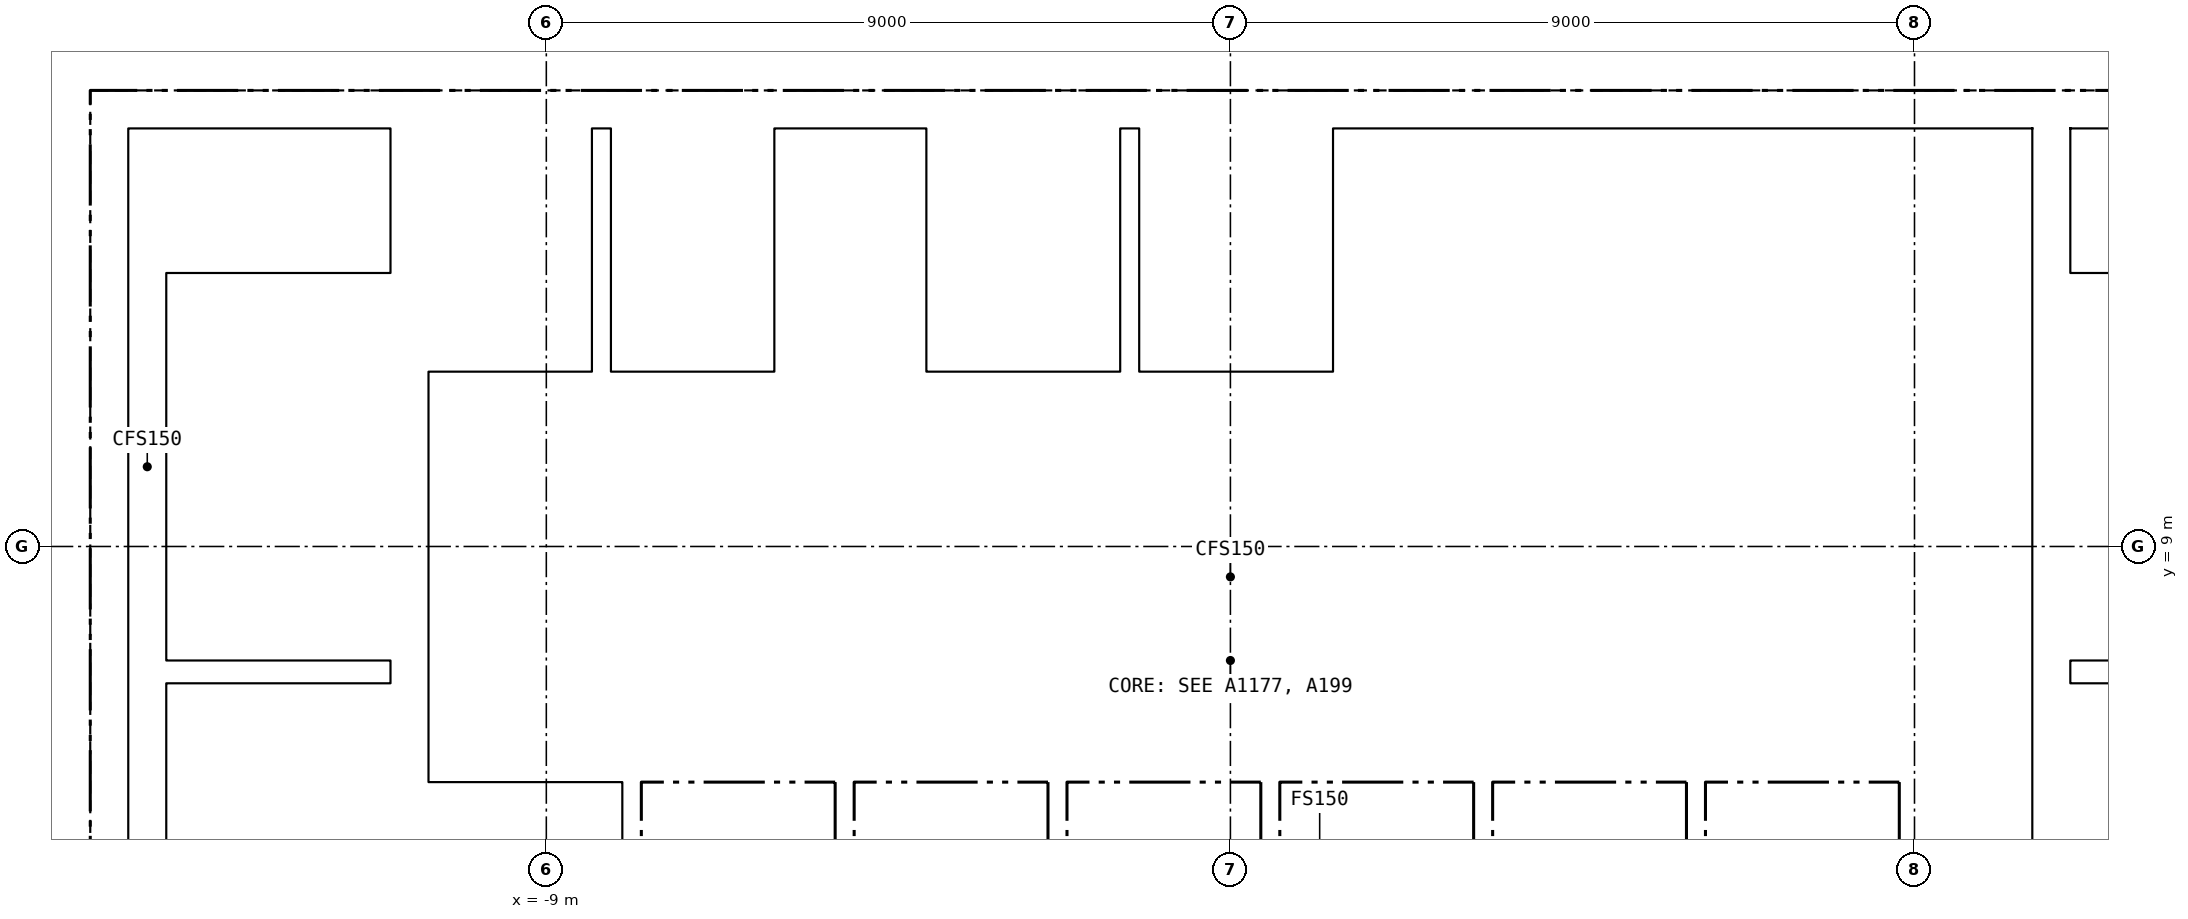
"""IFC4 building model, lengths in metres.
Left out: names, types, materials, properties, quantities, classifications, styles, units other than length and angle.
Written with IfcOpenShell. Run it as: python <this file> out.ifc"""

import sys

from ifc_helpers import new_model, si_unit, direction, frame, frame_2d, origin, place, context, subcontext, project, spatial, rectangle, extrude, element, fill, save


model = new_model("IFC4")
c1 = context("Model", 3, precision=1e-05, world=origin(), true_north=direction((0.0, 1.0)))
c2 = subcontext(c1, "Body", "Model", "MODEL_VIEW")
j1 = project(units=[si_unit("LENGTHUNIT", "METRE"), si_unit("PLANEANGLEUNIT", "RADIAN")], contexts=[c1])
p1 = place(None, origin())
s1 = spatial("IfcSite", under=j1, at=p1, CompositionType="ELEMENT")
p2 = place(p1, origin())
s2 = spatial("IfcBuilding", under=s1, at=p2, CompositionType="ELEMENT")
p3 = place(p2, frame((0.0, 0.0, 271.9)))
s3 = spatial("IfcBuildingStorey", under=s2, at=p3, CompositionType="ELEMENT", Elevation=271.9)
p4 = place(p3, frame((-15.0, 14.75, -0.15), z_axis=(0.0, 0.0, 1.0), x_axis=(1.0, 0.0, 0.0)))
e1 = element("IfcWall", 1, at=p4, inside=s3, PredefinedType="SOLIDWALL", context=c2, shape_type="SweptSolid", body=[
    extrude(rectangle(XDim=30.0, YDim=0.5, at=frame_2d((15.0, 0.0))), origin(), (0.0, 0.0, 1.0), 3.65),
])
p5 = place(p4, frame((9.25, 0.0, 0.15)))
e2 = element("IfcOpeningElement", 2, at=p5, cuts=e1, PredefinedType="OPENING", context=c2, shape_type="SweptSolid", body=[
    extrude(rectangle(XDim=1.5, YDim=2.1, at=frame_2d((0.75, 1.05))), frame((0.0, 0.26, 0.0), z_axis=(0.0, -1.0, 0.0), x_axis=(1.0, 0.0, 0.0)), (0.0, 0.0, 1.0), 0.52),
])
p6 = place(p4, frame((19.4, 0.0, 0.15)))
e3 = element("IfcOpeningElement", 3, at=p6, cuts=e1, PredefinedType="OPENING", context=c2, shape_type="SweptSolid", body=[
    extrude(rectangle(XDim=1.5, YDim=2.1, at=frame_2d((0.75, 1.05))), frame((0.0, 0.26, 0.0), z_axis=(0.0, -1.0, 0.0), x_axis=(1.0, 0.0, 0.0)), (0.0, 0.0, 1.0), 0.52),
])
p7 = place(p4, frame((1.5, 0.0, 0.15)))
e4 = element("IfcOpeningElement", 4, at=p7, cuts=e1, PredefinedType="OPENING", context=c2, shape_type="SweptSolid", body=[
    extrude(rectangle(XDim=1.2, YDim=2.1, at=frame_2d((0.6, 1.05))), frame((0.0, 0.26, 0.0), z_axis=(0.0, -1.0, 0.0), x_axis=(1.0, 0.0, 0.0)), (0.0, 0.0, 1.0), 0.52),
])
p8 = place(p4, frame((27.3, 0.0, 0.15)))
e5 = element("IfcOpeningElement", 5, at=p8, cuts=e1, PredefinedType="OPENING", context=c2, shape_type="SweptSolid", body=[
    extrude(rectangle(XDim=1.2, YDim=2.1, at=frame_2d((0.6, 1.05))), frame((0.0, 0.26, 0.0), z_axis=(0.0, -1.0, 0.0), x_axis=(1.0, 0.0, 0.0)), (0.0, 0.0, 1.0), 0.52),
])
for number, where, z_axis, x_axis in (
    (6, (-14.75, 0.5, -0.15), (0.0, 0.0, 1.0), (0.0, 1.0, 0.0)),
    (7, (-10.8, 0.5, -0.15), (0.0, 0.0, 1.0), (0.0, 1.0, 0.0)),
    (8, (10.8, 0.5, -0.15), (0.0, 0.0, 1.0), (0.0, 1.0, 0.0)),
):
    element("IfcWall", number, at=place(p3, frame(where, z_axis=z_axis, x_axis=x_axis)), inside=s3, PredefinedType="SOLIDWALL", context=c2, shape_type="SweptSolid", body=[
        extrude(rectangle(XDim=14.0, YDim=0.5, at=frame_2d((7.0, 0.0))), origin(), (0.0, 0.0, 1.0), 3.65),
    ])
p9 = place(p3, frame((-10.55, 6.025, 0.0), z_axis=(0.0, 0.0, 1.0), x_axis=(1.0, 0.0, 0.0)))
e9 = element("IfcWall", 9, at=p9, inside=s3, PredefinedType="PARTITIONING", context=c2, shape_type="SweptSolid", body=[
    extrude(rectangle(XDim=21.1, YDim=0.25, at=frame_2d((10.55, 0.0))), origin(), (0.0, 0.0, 1.0), 3.5),
])
p10 = place(p3, frame((-4.125, 8.55, 0.0), z_axis=(0.0, 0.0, 1.0), x_axis=(1.0, 0.0, 0.0)))
e10 = element("IfcWall", 10, at=p10, inside=s3, PredefinedType="PARTITIONING", context=c2, shape_type="SweptSolid", body=[
    extrude(rectangle(XDim=14.675, YDim=0.2, at=frame_2d((7.337, 0.0))), origin(), (0.0, 0.0, 1.0), 3.5),
])
p11 = place(p10, frame((2.438, 0.0, 0.0)))
e11 = element("IfcOpeningElement", 11, at=p11, cuts=e10, PredefinedType="OPENING", context=c2, shape_type="SweptSolid", body=[
    extrude(rectangle(XDim=1.0, YDim=2.1, at=frame_2d((0.5, 1.05))), frame((0.0, 0.11, 0.0), z_axis=(0.0, -1.0, 0.0), x_axis=(1.0, 0.0, 0.0)), (0.0, 0.0, 1.0), 0.22),
])
p12 = place(p10, frame((6.775, 0.0, 0.0)))
e12 = element("IfcOpeningElement", 12, at=p12, cuts=e10, PredefinedType="OPENING", context=c2, shape_type="SweptSolid", body=[
    extrude(rectangle(XDim=1.0, YDim=2.1, at=frame_2d((0.5, 1.05))), frame((0.0, 0.11, 0.0), z_axis=(0.0, -1.0, 0.0), x_axis=(1.0, 0.0, 0.0)), (0.0, 0.0, 1.0), 0.22),
])
p13 = place(p10, frame((10.363, 0.0, 0.0)))
e13 = element("IfcOpeningElement", 13, at=p13, cuts=e10, PredefinedType="OPENING", context=c2, shape_type="SweptSolid", body=[
    extrude(rectangle(XDim=1.0, YDim=2.1, at=frame_2d((0.5, 1.05))), frame((0.0, 0.11, 0.0), z_axis=(0.0, -1.0, 0.0), x_axis=(1.0, 0.0, 0.0)), (0.0, 0.0, 1.0), 0.22),
])
p14 = place(p10, frame((13.475, 0.0, 0.0)))
e14 = element("IfcOpeningElement", 14, at=p14, cuts=e10, PredefinedType="OPENING", context=c2, shape_type="SweptSolid", body=[
    extrude(rectangle(XDim=0.9, YDim=2.1, at=frame_2d((0.45, 1.05))), frame((0.0, 0.11, 0.0), z_axis=(0.0, -1.0, 0.0), x_axis=(1.0, 0.0, 0.0)), (0.0, 0.0, 1.0), 0.22),
])
p15 = place(p3, frame((-10.55, 11.2, 0.0), z_axis=(0.0, 0.0, 1.0), x_axis=(1.0, 0.0, 0.0)))
e15 = element("IfcWall", 15, at=p15, inside=s3, PredefinedType="PARTITIONING", context=c2, shape_type="SweptSolid", body=[
    extrude(rectangle(XDim=4.8, YDim=0.2, at=frame_2d((2.4, 0.0))), origin(), (0.0, 0.0, 1.0), 3.5),
])
p16 = place(p15, frame((0.525, 0.0, 0.0)))
e16 = element("IfcOpeningElement", 16, at=p16, cuts=e15, PredefinedType="OPENING", context=c2, shape_type="SweptSolid", body=[
    extrude(rectangle(XDim=1.1, YDim=2.1, at=frame_2d((0.55, 1.05))), frame((0.0, 0.11, 0.0), z_axis=(0.0, -1.0, 0.0), x_axis=(1.0, 0.0, 0.0)), (0.0, 0.0, 1.0), 0.22),
])
p17 = place(p15, frame((2.925, 0.0, 0.0)))
e17 = element("IfcOpeningElement", 17, at=p17, cuts=e15, PredefinedType="OPENING", context=c2, shape_type="SweptSolid", body=[
    extrude(rectangle(XDim=1.1, YDim=2.1, at=frame_2d((0.55, 1.05))), frame((0.0, 0.11, 0.0), z_axis=(0.0, -1.0, 0.0), x_axis=(1.0, 0.0, 0.0)), (0.0, 0.0, 1.0), 0.22),
])
p18 = place(p3, frame((-4.25, 11.2, 0.0), z_axis=(0.0, 0.0, 1.0), x_axis=(1.0, 0.0, 0.0)))
e18 = element("IfcWall", 18, at=p18, inside=s3, PredefinedType="PARTITIONING", context=c2, shape_type="SweptSolid", body=[
    extrude(rectangle(XDim=8.65, YDim=0.2, at=frame_2d((4.325, 0.0))), origin(), (0.0, 0.0, 1.0), 3.5),
])
p19 = place(p18, frame((0.825, 0.0, 0.0)))
e19 = element("IfcOpeningElement", 19, at=p19, cuts=e18, PredefinedType="OPENING", context=c2, shape_type="SweptSolid", body=[
    extrude(rectangle(XDim=1.4, YDim=2.1, at=frame_2d((0.7, 1.05))), frame((0.0, 0.11, 0.0), z_axis=(0.0, -1.0, 0.0), x_axis=(1.0, 0.0, 0.0)), (0.0, 0.0, 1.0), 0.22),
])
p20 = place(p18, frame((3.625, 0.0, 0.0)))
e20 = element("IfcOpeningElement", 20, at=p20, cuts=e18, PredefinedType="OPENING", context=c2, shape_type="SweptSolid", body=[
    extrude(rectangle(XDim=1.4, YDim=2.1, at=frame_2d((0.7, 1.05))), frame((0.0, 0.11, 0.0), z_axis=(0.0, -1.0, 0.0), x_axis=(1.0, 0.0, 0.0)), (0.0, 0.0, 1.0), 0.22),
])
p21 = place(p18, frame((6.675, 0.0, 0.0)))
e21 = element("IfcOpeningElement", 21, at=p21, cuts=e18, PredefinedType="OPENING", context=c2, shape_type="SweptSolid", body=[
    extrude(rectangle(XDim=0.9, YDim=2.1, at=frame_2d((0.45, 1.05))), frame((0.0, 0.11, 0.0), z_axis=(0.0, -1.0, 0.0), x_axis=(1.0, 0.0, 0.0)), (0.0, 0.0, 1.0), 0.22),
])
p22 = place(p3, frame((5.9, 11.2, 0.0), z_axis=(0.0, 0.0, 1.0), x_axis=(1.0, 0.0, 0.0)))
e22 = element("IfcWall", 22, at=p22, inside=s3, PredefinedType="PARTITIONING", context=c2, shape_type="SweptSolid", body=[
    extrude(rectangle(XDim=4.65, YDim=0.2, at=frame_2d((2.325, 0.0))), origin(), (0.0, 0.0, 1.0), 3.5),
])
p23 = place(p22, frame((1.075, 0.0, 0.0)))
e23 = element("IfcOpeningElement", 23, at=p23, cuts=e22, PredefinedType="OPENING", context=c2, shape_type="SweptSolid", body=[
    extrude(rectangle(XDim=0.9, YDim=2.1, at=frame_2d((0.45, 1.05))), frame((0.0, 0.11, 0.0), z_axis=(0.0, -1.0, 0.0), x_axis=(1.0, 0.0, 0.0)), (0.0, 0.0, 1.0), 0.22),
])
p24 = place(p22, frame((3.4, 0.0, 0.0)))
e24 = element("IfcOpeningElement", 24, at=p24, cuts=e22, PredefinedType="OPENING", context=c2, shape_type="SweptSolid", body=[
    extrude(rectangle(XDim=0.9, YDim=2.1, at=frame_2d((0.45, 1.05))), frame((0.0, 0.11, 0.0), z_axis=(0.0, -1.0, 0.0), x_axis=(1.0, 0.0, 0.0)), (0.0, 0.0, 1.0), 0.22),
])
p25 = place(p3, frame((-4.125, 6.15, 0.0), z_axis=(0.0, 0.0, 1.0), x_axis=(0.0, 1.0, 0.0)))
e25 = element("IfcWall", 25, at=p25, inside=s3, PredefinedType="PARTITIONING", context=c2, shape_type="SweptSolid", body=[
    extrude(rectangle(XDim=4.95, YDim=0.25, at=frame_2d((2.475, 0.0))), origin(), (0.0, 0.0, 1.0), 3.5),
])
p26 = place(p25, frame((3.125, 0.0, 0.0)))
e26 = element("IfcOpeningElement", 26, at=p26, cuts=e25, PredefinedType="OPENING", context=c2, shape_type="SweptSolid", body=[
    extrude(rectangle(XDim=1.2, YDim=2.1, at=frame_2d((0.6, 1.05))), frame((0.0, 0.135, 0.0), z_axis=(0.0, -1.0, 0.0), x_axis=(1.0, 0.0, 0.0)), (0.0, 0.0, 1.0), 0.27),
])
for number, where, z_axis, x_axis in (
    (27, (-7.875, 3.6, 0.0), (0.0, 0.0, 1.0), (0.0, 1.0, 0.0)),
    (28, (-5.075, 3.6, 0.0), (0.0, 0.0, 1.0), (0.0, 1.0, 0.0)),
    (29, (-2.275, 3.6, 0.0), (0.0, 0.0, 1.0), (0.0, 1.0, 0.0)),
    (30, (0.525, 3.6, 0.0), (0.0, 0.0, 1.0), (0.0, 1.0, 0.0)),
    (31, (3.325, 3.6, 0.0), (0.0, 0.0, 1.0), (0.0, 1.0, 0.0)),
    (32, (6.125, 3.6, 0.0), (0.0, 0.0, 1.0), (0.0, 1.0, 0.0)),
    (33, (8.925, 3.6, 0.0), (0.0, 0.0, 1.0), (0.0, 1.0, 0.0)),
):
    element("IfcWall", number, at=place(p3, frame(where, z_axis=z_axis, x_axis=x_axis)), inside=s3, PredefinedType="PARTITIONING", context=c2, shape_type="SweptSolid", body=[
        extrude(rectangle(XDim=2.3, YDim=0.25, at=frame_2d((1.15, 0.0))), origin(), (0.0, 0.0, 1.0), 3.5),
    ])
for number, where, z_axis, x_axis in (
    (34, (1.7, 6.15, 0.0), (0.0, 0.0, 1.0), (0.0, 1.0, 0.0)),
    (35, (4.6, 6.15, 0.0), (0.0, 0.0, 1.0), (0.0, 1.0, 0.0)),
):
    element("IfcWall", number, at=place(p3, frame(where, z_axis=z_axis, x_axis=x_axis)), inside=s3, PredefinedType="PARTITIONING", context=c2, shape_type="SweptSolid", body=[
        extrude(rectangle(XDim=2.3, YDim=0.15, at=frame_2d((1.15, 0.0))), origin(), (0.0, 0.0, 1.0), 3.5),
    ])
p27 = place(p3, frame((8.925, 6.15, 0.0), z_axis=(0.0, 0.0, 1.0), x_axis=(0.0, 1.0, 0.0)))
e36 = element("IfcWall", 36, at=p27, inside=s3, PredefinedType="PARTITIONING", context=c2, shape_type="SweptSolid", body=[
    extrude(rectangle(XDim=2.3, YDim=0.25, at=frame_2d((1.15, 0.0))), origin(), (0.0, 0.0, 1.0), 3.5),
])
for number, where, z_axis, x_axis in (
    (37, (-8.275, 11.3, 0.0), (0.0, 0.0, 1.0), (0.0, 1.0, 0.0)),
    (38, (-5.875, 11.3, 0.0), (0.0, 0.0, 1.0), (0.0, 1.0, 0.0)),
    (39, (-4.125, 11.3, 0.0), (0.0, 0.0, 1.0), (0.0, 1.0, 0.0)),
    (40, (-1.325, 11.3, 0.0), (0.0, 0.0, 1.0), (0.0, 1.0, 0.0)),
    (41, (1.475, 11.3, 0.0), (0.0, 0.0, 1.0), (0.0, 1.0, 0.0)),
    (42, (4.275, 11.3, 0.0), (0.0, 0.0, 1.0), (0.0, 1.0, 0.0)),
    (43, (6.025, 11.3, 0.0), (0.0, 0.0, 1.0), (0.0, 1.0, 0.0)),
    (44, (8.825, 11.3, 0.0), (0.0, 0.0, 1.0), (0.0, 1.0, 0.0)),
):
    element("IfcWall", number, at=place(p3, frame(where, z_axis=z_axis, x_axis=x_axis)), inside=s3, PredefinedType="PARTITIONING", context=c2, shape_type="SweptSolid", body=[
        extrude(rectangle(XDim=3.2, YDim=0.25, at=frame_2d((1.6, 0.0))), origin(), (0.0, 0.0, 1.0), 3.5),
    ])
p28 = place(p3, frame((-14.0, 7.35, 0.0), z_axis=(0.0, 0.0, 1.0), x_axis=(1.0, 0.0, 0.0)))
e45 = element("IfcWall", 45, at=p28, inside=s3, PredefinedType="SOLIDWALL", context=c2, shape_type="SweptSolid", body=[
    extrude(rectangle(XDim=2.95, YDim=0.3, at=frame_2d((1.475, 0.0))), origin(), (0.0, 0.0, 1.0), 3.5),
])
p29 = place(p3, frame((-14.25, 0.5, 0.0), z_axis=(0.0, 0.0, 1.0), x_axis=(0.0, 1.0, 0.0)))
e46 = element("IfcWall", 46, at=p29, inside=s3, PredefinedType="SOLIDWALL", context=c2, shape_type="SweptSolid", body=[
    extrude(rectangle(XDim=14.0, YDim=0.5, at=frame_2d((7.0, 0.0))), origin(), (0.0, 0.0, 1.0), 3.5),
])
p30 = place(p3, frame((11.05, 7.35, 0.0), z_axis=(0.0, 0.0, 1.0), x_axis=(1.0, 0.0, 0.0)))
e47 = element("IfcWall", 47, at=p30, inside=s3, PredefinedType="SOLIDWALL", context=c2, shape_type="SweptSolid", body=[
    extrude(rectangle(XDim=2.95, YDim=0.3, at=frame_2d((1.475, 0.0))), origin(), (0.0, 0.0, 1.0), 3.5),
])
p31 = place(p3, frame((-17.177, 11.848, 0.0), z_axis=(0.0, 0.0, 1.0), x_axis=(0.309030503714, 0.951052126739, 0.0)))
e48 = element("IfcWall", 48, at=p31, inside=s3, PredefinedType="PARTITIONING", context=c2, shape_type="SweptSolid", body=[
    extrude(rectangle(XDim=5.563, YDim=0.15, at=frame_2d((2.782, 0.0))), origin(), (0.0, 0.0, 1.0), 2.751),
])
p32 = place(p26, origin())
e49 = element("IfcDoor", 49, at=p32, inside=s3, OperationType="SINGLE_SWING_LEFT", PredefinedType="DOOR", context=c2, shape_type="SweptSolid", body=[
    extrude(rectangle(XDim=1.2, YDim=2.1, at=frame_2d((0.6, 1.05))), frame((0.0, 0.025, 0.0), z_axis=(0.0, -1.0, 0.0), x_axis=(1.0, 0.0, 0.0)), (0.0, 0.0, 1.0), 0.05),
])
fill(e26, e49)
p33 = place(p11, origin())
e50 = element("IfcDoor", 50, at=p33, inside=s3, OperationType="SINGLE_SWING_LEFT", PredefinedType="DOOR", context=c2, shape_type="SweptSolid", body=[
    extrude(rectangle(XDim=1.0, YDim=2.1, at=frame_2d((0.5, 1.05))), frame((0.0, 0.025, 0.0), z_axis=(0.0, -1.0, 0.0), x_axis=(1.0, 0.0, 0.0)), (0.0, 0.0, 1.0), 0.05),
])
fill(e11, e50)
p34 = place(p12, origin())
e51 = element("IfcDoor", 51, at=p34, inside=s3, OperationType="SINGLE_SWING_RIGHT", PredefinedType="DOOR", context=c2, shape_type="SweptSolid", body=[
    extrude(rectangle(XDim=1.0, YDim=2.1, at=frame_2d((0.5, 1.05))), frame((0.0, 0.025, 0.0), z_axis=(0.0, -1.0, 0.0), x_axis=(1.0, 0.0, 0.0)), (0.0, 0.0, 1.0), 0.05),
])
fill(e12, e51)
p35 = place(p13, origin())
e52 = element("IfcDoor", 52, at=p35, inside=s3, OperationType="SINGLE_SWING_LEFT", PredefinedType="DOOR", context=c2, shape_type="SweptSolid", body=[
    extrude(rectangle(XDim=1.0, YDim=2.1, at=frame_2d((0.5, 1.05))), frame((0.0, 0.025, 0.0), z_axis=(0.0, -1.0, 0.0), x_axis=(1.0, 0.0, 0.0)), (0.0, 0.0, 1.0), 0.05),
])
fill(e13, e52)
p36 = place(p14, origin())
e53 = element("IfcDoor", 53, at=p36, inside=s3, OperationType="SINGLE_SWING_RIGHT", PredefinedType="DOOR", context=c2, shape_type="SweptSolid", body=[
    extrude(rectangle(XDim=0.9, YDim=2.1, at=frame_2d((0.45, 1.05))), frame((0.0, 0.025, 0.0), z_axis=(0.0, -1.0, 0.0), x_axis=(1.0, 0.0, 0.0)), (0.0, 0.0, 1.0), 0.05),
])
fill(e14, e53)
p37 = place(p16, origin())
e54 = element("IfcDoor", 54, at=p37, inside=s3, OperationType="DOUBLE_DOOR_SLIDING", PredefinedType="DOOR", context=c2, shape_type="SweptSolid", body=[
    extrude(rectangle(XDim=1.1, YDim=2.1, at=frame_2d((0.55, 1.05))), frame((0.0, 0.025, 0.0), z_axis=(0.0, -1.0, 0.0), x_axis=(1.0, 0.0, 0.0)), (0.0, 0.0, 1.0), 0.05),
])
fill(e16, e54)
p38 = place(p17, origin())
e55 = element("IfcDoor", 55, at=p38, inside=s3, OperationType="DOUBLE_DOOR_SLIDING", PredefinedType="DOOR", context=c2, shape_type="SweptSolid", body=[
    extrude(rectangle(XDim=1.1, YDim=2.1, at=frame_2d((0.55, 1.05))), frame((0.0, 0.025, 0.0), z_axis=(0.0, -1.0, 0.0), x_axis=(1.0, 0.0, 0.0)), (0.0, 0.0, 1.0), 0.05),
])
fill(e17, e55)
p39 = place(p19, origin())
e56 = element("IfcDoor", 56, at=p39, inside=s3, OperationType="DOUBLE_DOOR_SLIDING", PredefinedType="DOOR", context=c2, shape_type="SweptSolid", body=[
    extrude(rectangle(XDim=1.4, YDim=2.1, at=frame_2d((0.7, 1.05))), frame((0.0, 0.025, 0.0), z_axis=(0.0, -1.0, 0.0), x_axis=(1.0, 0.0, 0.0)), (0.0, 0.0, 1.0), 0.05),
])
fill(e19, e56)
p40 = place(p20, origin())
e57 = element("IfcDoor", 57, at=p40, inside=s3, OperationType="DOUBLE_DOOR_SLIDING", PredefinedType="DOOR", context=c2, shape_type="SweptSolid", body=[
    extrude(rectangle(XDim=1.4, YDim=2.1, at=frame_2d((0.7, 1.05))), frame((0.0, 0.025, 0.0), z_axis=(0.0, -1.0, 0.0), x_axis=(1.0, 0.0, 0.0)), (0.0, 0.0, 1.0), 0.05),
])
fill(e20, e57)
p41 = place(p21, origin())
e58 = element("IfcDoor", 58, at=p41, inside=s3, OperationType="SINGLE_SWING_LEFT", PredefinedType="DOOR", context=c2, shape_type="SweptSolid", body=[
    extrude(rectangle(XDim=0.9, YDim=2.1, at=frame_2d((0.45, 1.05))), frame((0.0, 0.025, 0.0), z_axis=(0.0, -1.0, 0.0), x_axis=(1.0, 0.0, 0.0)), (0.0, 0.0, 1.0), 0.05),
])
fill(e21, e58)
p42 = place(p23, origin())
e59 = element("IfcDoor", 59, at=p42, inside=s3, OperationType="SINGLE_SWING_RIGHT", PredefinedType="DOOR", context=c2, shape_type="SweptSolid", body=[
    extrude(rectangle(XDim=0.9, YDim=2.1, at=frame_2d((0.45, 1.05))), frame((0.0, 0.025, 0.0), z_axis=(0.0, -1.0, 0.0), x_axis=(1.0, 0.0, 0.0)), (0.0, 0.0, 1.0), 0.05),
])
fill(e23, e59)
p43 = place(p24, origin())
e60 = element("IfcDoor", 60, at=p43, inside=s3, OperationType="SINGLE_SWING_LEFT", PredefinedType="DOOR", context=c2, shape_type="SweptSolid", body=[
    extrude(rectangle(XDim=0.9, YDim=2.1, at=frame_2d((0.45, 1.05))), frame((0.0, 0.025, 0.0), z_axis=(0.0, -1.0, 0.0), x_axis=(1.0, 0.0, 0.0)), (0.0, 0.0, 1.0), 0.05),
])
fill(e24, e60)
p44 = place(p5, origin())
e61 = element("IfcDoor", 61, at=p44, inside=s3, OperationType="DOUBLE_DOOR_SINGLE_SWING", PredefinedType="DOOR", context=c2, shape_type="SweptSolid", body=[
    extrude(rectangle(XDim=1.5, YDim=2.1, at=frame_2d((0.75, 1.05))), frame((0.0, 0.025, 0.0), z_axis=(0.0, -1.0, 0.0), x_axis=(1.0, 0.0, 0.0)), (0.0, 0.0, 1.0), 0.05),
])
fill(e2, e61)
p45 = place(p6, origin())
e62 = element("IfcDoor", 62, at=p45, inside=s3, OperationType="DOUBLE_DOOR_SINGLE_SWING", PredefinedType="DOOR", context=c2, shape_type="SweptSolid", body=[
    extrude(rectangle(XDim=1.5, YDim=2.1, at=frame_2d((0.75, 1.05))), frame((0.0, 0.025, 0.0), z_axis=(0.0, -1.0, 0.0), x_axis=(1.0, 0.0, 0.0)), (0.0, 0.0, 1.0), 0.05),
])
fill(e3, e62)
p46 = place(p7, origin())
e63 = element("IfcDoor", 63, at=p46, inside=s3, OperationType="SINGLE_SWING_RIGHT", PredefinedType="DOOR", context=c2, shape_type="SweptSolid", body=[
    extrude(rectangle(XDim=1.2, YDim=2.1, at=frame_2d((0.6, 1.05))), frame((0.0, 0.025, 0.0), z_axis=(0.0, -1.0, 0.0), x_axis=(1.0, 0.0, 0.0)), (0.0, 0.0, 1.0), 0.05),
])
fill(e4, e63)
save(model, sys.argv[1])
